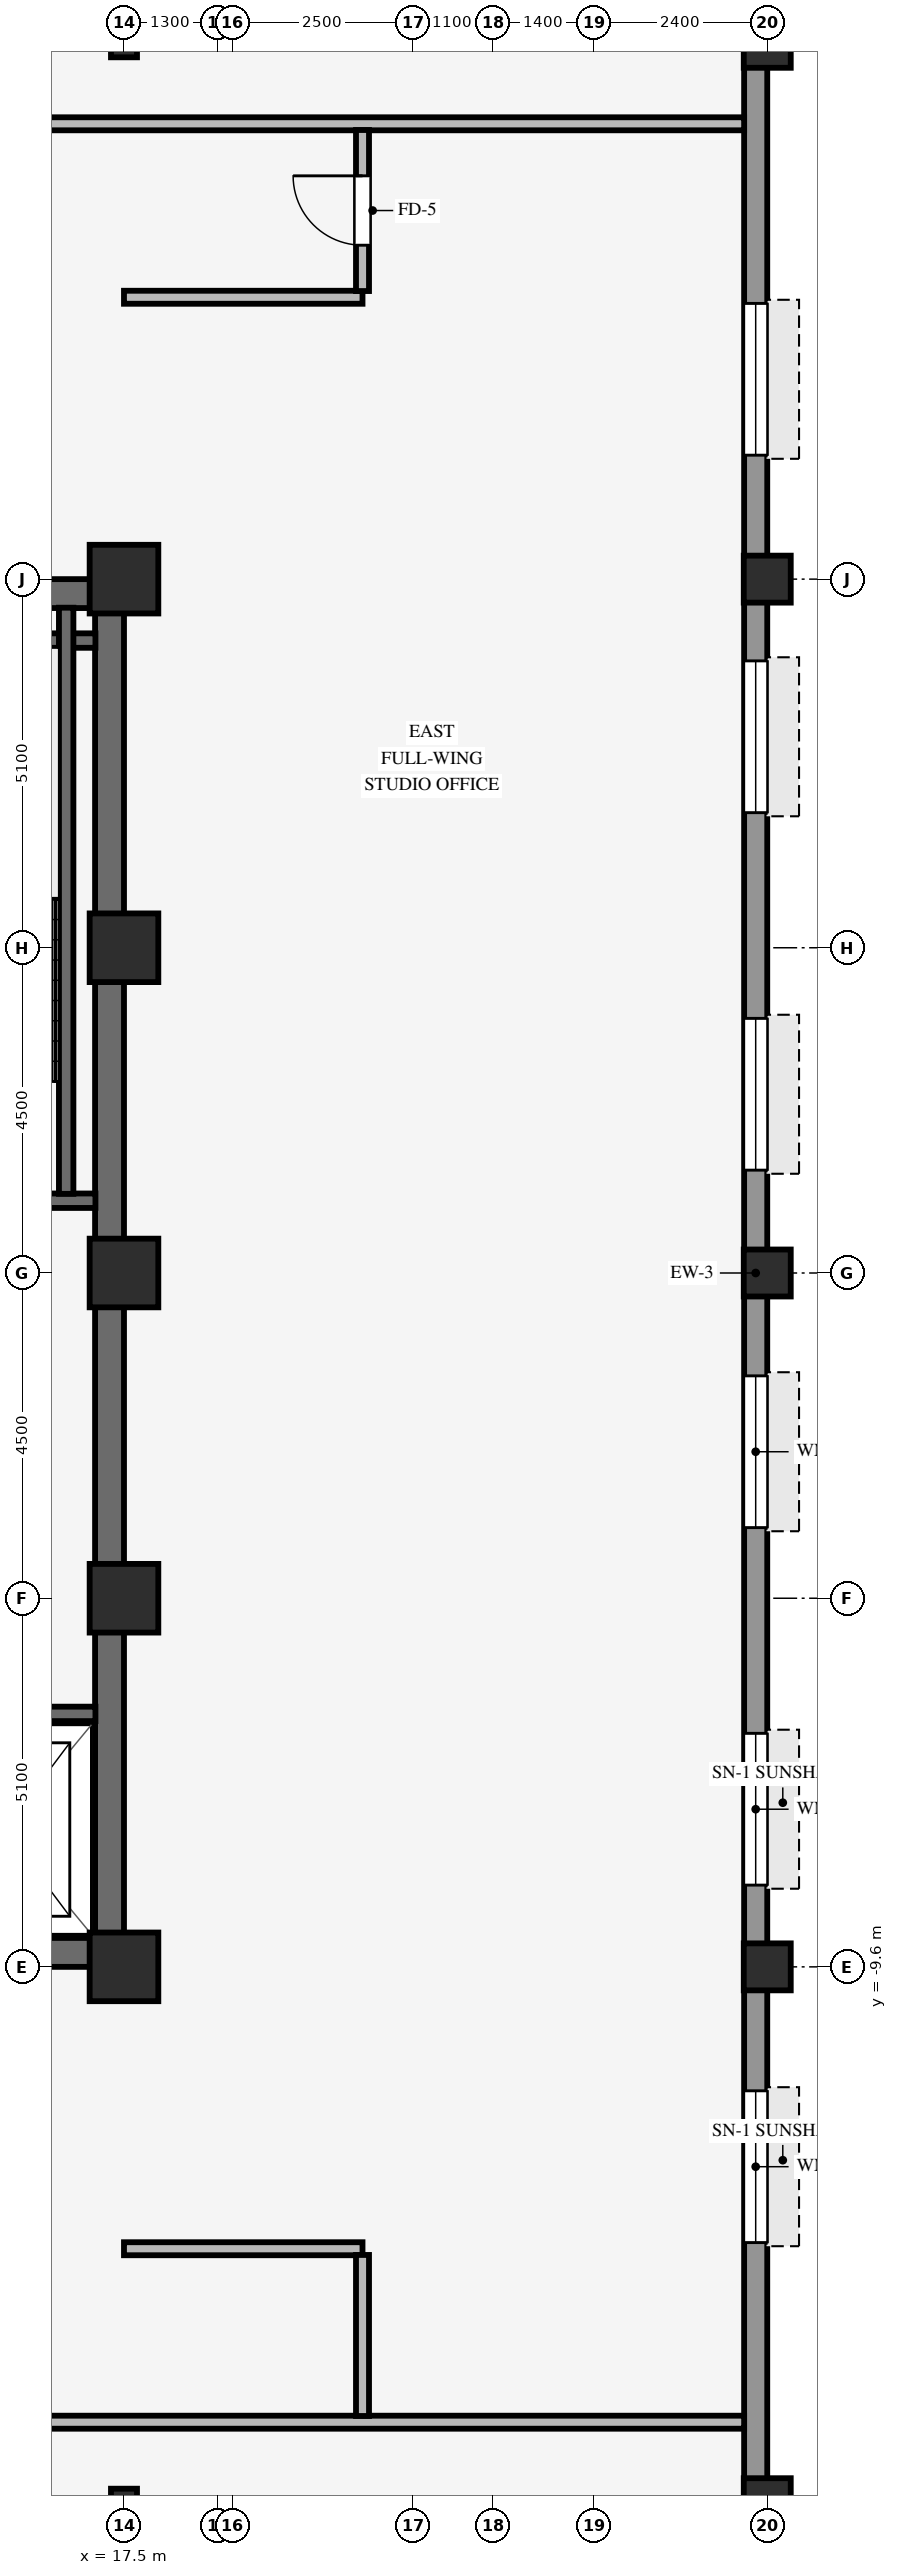
"""IFC4 building model, lengths in metres.
Left out: names, types, materials, properties, quantities, classifications, styles, units other than length and angle.
Written with IfcOpenShell. Run it as: python <this file> out.ifc"""

import sys

from ifc_helpers import new_model, si_unit, direction, frame, frame_2d, origin, origin_2d, place, context, subcontext, project, spatial, rectangle, hollow_rectangle, i_section, extrude, source, transform, mapped, element, fill, save


model = new_model("IFC4")
c1 = context("Model", 3, precision=1e-05, world=origin(), true_north=direction((0.0, 1.0)))
c2 = subcontext(c1, "Body", "Model", "MODEL_VIEW")
j1 = project(units=[si_unit("LENGTHUNIT", "METRE"), si_unit("PLANEANGLEUNIT", "RADIAN")], contexts=[c1])
p1 = place(None, origin())
s1 = spatial("IfcSite", under=j1, at=p1, CompositionType="ELEMENT")
p2 = place(p1, origin())
s2 = spatial("IfcBuilding", under=s1, at=p2, CompositionType="ELEMENT")
p3 = place(p2, frame((0.0, 0.0, 149.4)))
s3 = spatial("IfcBuildingStorey", under=s2, at=p3, CompositionType="ELEMENT", Elevation=149.4)
for number, where, z_axis, x_axis in (
    (1, (9.0, -9.4, 0.0), (0.0, 0.0, 1.0), (1.0, 0.0, 0.0)),
    (2, (9.0, 9.4, 0.0), (0.0, 0.0, 1.0), (1.0, 0.0, 0.0)),
):
    element("IfcWall", number, at=place(p3, frame(where, z_axis=z_axis, x_axis=x_axis)), inside=s3, PredefinedType="SHEAR", context=c2, shape_type="SweptSolid", body=[
        extrude(rectangle(XDim=8.5, YDim=0.4, at=frame_2d((4.25, 0.0))), origin(), (0.0, 0.0, 1.0), 3.37),
    ])
p4 = place(p3, frame((17.3, -9.205, 0.0), z_axis=(0.0, 0.0, 1.0), x_axis=(0.0, 1.0, 0.0)))
e3 = element("IfcWall", 3, at=p4, inside=s3, PredefinedType="SHEAR", context=c2, shape_type="SweptSolid", body=[
    extrude(rectangle(XDim=18.41, YDim=0.4, at=frame_2d((9.205, 0.0))), origin(), (0.0, 0.0, 1.0), 3.37),
])
for number, where, z_axis, x_axis in (
    (4, (17.5, -9.6, 0.0), (0.0, 0.0, 1.0), (1.0, 0.0, 0.0)),
    (5, (17.5, -4.5, 0.0), (0.0, 0.0, 1.0), (1.0, 0.0, 0.0)),
    (6, (17.5, 4.5, 0.0), (0.0, 0.0, 1.0), (1.0, 0.0, 0.0)),
    (7, (17.5, 9.6, 0.0), (0.0, 0.0, 1.0), (1.0, 0.0, 0.0)),
    (8, (17.5, 0.0, 0.0), (0.0, 0.0, 1.0), (1.0, 0.0, 0.0)),
):
    element("IfcColumn", number, at=place(p3, frame(where, z_axis=z_axis, x_axis=x_axis)), inside=s3, PredefinedType="COLUMN", context=c2, shape_type="SweptSolid", body=[
        extrude(rectangle(XDim=0.95, YDim=0.95, at=origin_2d()), origin(), (0.0, 0.0, 1.0), 3.37),
    ])
for number, where, z_axis, x_axis in (
    (9, (26.4, -17.0, 0.0), (0.0, 0.0, 1.0), (1.0, 0.0, 0.0)),
    (10, (26.4, -9.6, 0.0), (0.0, 0.0, 1.0), (1.0, 0.0, 0.0)),
    (11, (26.4, 0.0, 0.0), (0.0, 0.0, 1.0), (1.0, 0.0, 0.0)),
    (12, (26.4, 9.6, 0.0), (0.0, 0.0, 1.0), (1.0, 0.0, 0.0)),
    (13, (26.4, 17.0, 0.0), (0.0, 0.0, 1.0), (1.0, 0.0, 0.0)),
):
    element("IfcColumn", number, at=place(p3, frame(where, z_axis=z_axis, x_axis=x_axis)), inside=s3, PredefinedType="COLUMN", context=c2, shape_type="SweptSolid", body=[
        extrude(hollow_rectangle(XDim=0.65, YDim=0.65, WallThickness=0.04, InnerFilletRadius=0.04, OuterFilletRadius=0.08, at=origin_2d()), origin(), (0.0, 0.0, 1.0), 3.37),
    ])
for number, where, z_axis, x_axis in (
    (14, (17.5, -17.0, 0.0), (0.0, 0.0, 1.0), (1.0, 0.0, 0.0)),
    (15, (17.5, 17.0, 0.0), (0.0, 0.0, 1.0), (1.0, 0.0, 0.0)),
):
    element("IfcColumn", number, at=place(p3, frame(where, z_axis=z_axis, x_axis=x_axis)), inside=s3, PredefinedType="COLUMN", context=c2, shape_type="SweptSolid", body=[
        extrude(i_section(OverallWidth=0.36, OverallDepth=0.36, WebThickness=0.021, FlangeThickness=0.021, FilletRadius=0.018, at=origin_2d()), origin(), (0.0, 0.0, 1.0), 3.37),
    ])
p5 = place(p3, frame((26.24, -20.784, 0.0), z_axis=(0.0, 0.0, 1.0), x_axis=(0.0, 1.0, 0.0)))
e16 = element("IfcWall", 16, at=p5, inside=s3, PredefinedType="STANDARD", context=c2, shape_type="SweptSolid", body=[
    extrude(rectangle(XDim=41.568, YDim=0.32, at=frame_2d((20.784, 0.0))), origin(), (0.0, 0.0, 1.0), 2.705),
])
p6 = place(p5, frame((7.369, 0.0, 0.8)))
e17 = element("IfcOpeningElement", 17, at=p6, cuts=e16, PredefinedType="OPENING", context=c2, shape_type="SweptSolid", body=[
    extrude(rectangle(XDim=2.1, YDim=1.56, at=frame_2d((1.05, 0.78))), frame((0.0, 0.17, 0.0), z_axis=(0.0, -1.0, 0.0), x_axis=(1.0, 0.0, 0.0)), (0.0, 0.0, 1.0), 0.34),
])
p7 = place(p5, frame((12.315, 0.0, 0.8)))
e18 = element("IfcOpeningElement", 18, at=p7, cuts=e16, PredefinedType="OPENING", context=c2, shape_type="SweptSolid", body=[
    extrude(rectangle(XDim=2.1, YDim=1.56, at=frame_2d((1.05, 0.78))), frame((0.0, 0.17, 0.0), z_axis=(0.0, -1.0, 0.0), x_axis=(1.0, 0.0, 0.0)), (0.0, 0.0, 1.0), 0.34),
])
p8 = place(p5, frame((17.261, 0.0, 0.8)))
e19 = element("IfcOpeningElement", 19, at=p8, cuts=e16, PredefinedType="OPENING", context=c2, shape_type="SweptSolid", body=[
    extrude(rectangle(XDim=2.1, YDim=1.56, at=frame_2d((1.05, 0.78))), frame((0.0, 0.17, 0.0), z_axis=(0.0, -1.0, 0.0), x_axis=(1.0, 0.0, 0.0)), (0.0, 0.0, 1.0), 0.34),
])
p9 = place(p5, frame((22.207, 0.0, 0.8)))
e20 = element("IfcOpeningElement", 20, at=p9, cuts=e16, PredefinedType="OPENING", context=c2, shape_type="SweptSolid", body=[
    extrude(rectangle(XDim=2.1, YDim=1.56, at=frame_2d((1.05, 0.78))), frame((0.0, 0.17, 0.0), z_axis=(0.0, -1.0, 0.0), x_axis=(1.0, 0.0, 0.0)), (0.0, 0.0, 1.0), 0.34),
])
p10 = place(p5, frame((27.153, 0.0, 0.8)))
e21 = element("IfcOpeningElement", 21, at=p10, cuts=e16, PredefinedType="OPENING", context=c2, shape_type="SweptSolid", body=[
    extrude(rectangle(XDim=2.1, YDim=1.56, at=frame_2d((1.05, 0.78))), frame((0.0, 0.17, 0.0), z_axis=(0.0, -1.0, 0.0), x_axis=(1.0, 0.0, 0.0)), (0.0, 0.0, 1.0), 0.34),
])
p11 = place(p5, frame((32.099, 0.0, 0.8)))
e22 = element("IfcOpeningElement", 22, at=p11, cuts=e16, PredefinedType="OPENING", context=c2, shape_type="SweptSolid", body=[
    extrude(rectangle(XDim=2.1, YDim=1.56, at=frame_2d((1.05, 0.78))), frame((0.0, 0.17, 0.0), z_axis=(0.0, -1.0, 0.0), x_axis=(1.0, 0.0, 0.0)), (0.0, 0.0, 1.0), 0.34),
])
for number, where, z_axis, x_axis in (
    (23, (13.535, 1.0, 0.0), (0.0, 0.0, 1.0), (1.0, 0.0, 0.0)),
    (24, (13.535, 8.75, 0.0), (0.0, 0.0, 1.0), (1.0, 0.0, 0.0)),
):
    element("IfcWall", number, at=place(p3, frame(where, z_axis=z_axis, x_axis=x_axis)), inside=s3, PredefinedType="SHEAR", context=c2, shape_type="SweptSolid", body=[
        extrude(rectangle(XDim=3.57, YDim=0.2, at=frame_2d((1.785, 0.0))), origin(), (0.0, 0.0, 1.0), 3.37),
    ])
p12 = place(p3, frame((16.7, 1.095, 0.0), z_axis=(0.0, 0.0, 1.0), x_axis=(0.0, 1.0, 0.0)))
e25 = element("IfcWall", 25, at=p12, inside=s3, PredefinedType="SHEAR", context=c2, shape_type="SweptSolid", body=[
    extrude(rectangle(XDim=8.11, YDim=0.2, at=frame_2d((4.055, 0.0))), origin(), (0.0, 0.0, 1.0), 3.37),
])
p13 = place(p3, frame((14.645, -6.1, 0.0), z_axis=(0.0, 0.0, 1.0), x_axis=(1.0, 0.0, 0.0)))
e26 = element("IfcWall", 26, at=p13, inside=s3, PredefinedType="SHEAR", context=c2, shape_type="SweptSolid", body=[
    extrude(rectangle(XDim=2.46, YDim=0.2, at=frame_2d((1.23, 0.0))), origin(), (0.0, 0.0, 1.0), 3.37),
])
p14 = place(p3, frame((-26.08, -15.9, 0.0), z_axis=(0.0, 0.0, 1.0), x_axis=(1.0, 0.0, 0.0)))
e27 = element("IfcWall", 27, at=p14, inside=s3, PredefinedType="PARTITIONING", context=c2, shape_type="SweptSolid", body=[
    extrude(rectangle(XDim=52.16, YDim=0.18, at=frame_2d((26.08, 0.0))), origin(), (0.0, 0.0, 1.0), 3.36),
])
p15 = place(p14, frame((24.5, 0.0, 0.0)))
e28 = element("IfcOpeningElement", 28, at=p15, cuts=e27, PredefinedType="OPENING", context=c2, shape_type="SweptSolid", body=[
    extrude(rectangle(XDim=0.96, YDim=2.1, at=frame_2d((0.48, 1.05))), frame((0.0, 0.1, 0.0), z_axis=(0.0, -1.0, 0.0), x_axis=(1.0, 0.0, 0.0)), (0.0, 0.0, 1.0), 0.2),
])
p16 = place(p14, frame((40.5, 0.0, 0.0)))
e29 = element("IfcOpeningElement", 29, at=p16, cuts=e27, PredefinedType="OPENING", context=c2, shape_type="SweptSolid", body=[
    extrude(rectangle(XDim=0.96, YDim=2.1, at=frame_2d((0.48, 1.05))), frame((0.0, 0.1, 0.0), z_axis=(0.0, -1.0, 0.0), x_axis=(1.0, 0.0, 0.0)), (0.0, 0.0, 1.0), 0.2),
])
p17 = place(p14, frame((13.16, 0.0, 0.0)))
e30 = element("IfcOpeningElement", 30, at=p17, cuts=e27, PredefinedType="OPENING", context=c2, shape_type="SweptSolid", body=[
    extrude(rectangle(XDim=0.96, YDim=2.1, at=frame_2d((0.48, 1.05))), frame((0.0, 0.1, 0.0), z_axis=(0.0, -1.0, 0.0), x_axis=(1.0, 0.0, 0.0)), (0.0, 0.0, 1.0), 0.2),
])
p18 = place(p14, frame((6.425, 0.0, 0.0)))
e31 = element("IfcOpeningElement", 31, at=p18, cuts=e27, PredefinedType="OPENING", context=c2, shape_type="SweptSolid", body=[
    extrude(rectangle(XDim=0.96, YDim=2.1, at=frame_2d((0.48, 1.05))), frame((0.0, 0.1, 0.0), z_axis=(0.0, -1.0, 0.0), x_axis=(1.0, 0.0, 0.0)), (0.0, 0.0, 1.0), 0.2),
])
for number, where, z_axis, x_axis in (
    (32, (17.5, -13.5, 0.0), (0.0, 0.0, 1.0), (1.0, 0.0, 0.0)),
    (33, (17.5, 13.5, 0.0), (0.0, 0.0, 1.0), (1.0, 0.0, 0.0)),
):
    element("IfcWall", number, at=place(p3, frame(where, z_axis=z_axis, x_axis=x_axis)), inside=s3, PredefinedType="PARTITIONING", context=c2, shape_type="SweptSolid", body=[
        extrude(rectangle(XDim=3.3, YDim=0.18, at=frame_2d((1.65, 0.0))), origin(), (0.0, 0.0, 1.0), 2.998),
    ])
p19 = place(p3, frame((-26.08, 15.9, 0.0), z_axis=(0.0, 0.0, 1.0), x_axis=(1.0, 0.0, 0.0)))
e34 = element("IfcWall", 34, at=p19, inside=s3, PredefinedType="PARTITIONING", context=c2, shape_type="SweptSolid", body=[
    extrude(rectangle(XDim=52.16, YDim=0.18, at=frame_2d((26.08, 0.0))), origin(), (0.0, 0.0, 1.0), 3.36),
])
p20 = place(p19, frame((26.72, 0.0, 0.0)))
e35 = element("IfcOpeningElement", 35, at=p20, cuts=e34, PredefinedType="OPENING", context=c2, shape_type="SweptSolid", body=[
    extrude(rectangle(XDim=0.96, YDim=2.1, at=frame_2d((0.48, 1.05))), frame((0.0, 0.1, 0.0), z_axis=(0.0, -1.0, 0.0), x_axis=(1.0, 0.0, 0.0)), (0.0, 0.0, 1.0), 0.2),
])
p21 = place(p19, frame((40.5, 0.0, 0.0)))
e36 = element("IfcOpeningElement", 36, at=p21, cuts=e34, PredefinedType="OPENING", context=c2, shape_type="SweptSolid", body=[
    extrude(rectangle(XDim=0.96, YDim=2.1, at=frame_2d((0.48, 1.05))), frame((0.0, 0.1, 0.0), z_axis=(0.0, -1.0, 0.0), x_axis=(1.0, 0.0, 0.0)), (0.0, 0.0, 1.0), 0.2),
])
p22 = place(p19, frame((13.61, 0.0, 0.0)))
e37 = element("IfcOpeningElement", 37, at=p22, cuts=e34, PredefinedType="OPENING", context=c2, shape_type="SweptSolid", body=[
    extrude(rectangle(XDim=0.96, YDim=2.1, at=frame_2d((0.48, 1.05))), frame((0.0, 0.1, 0.0), z_axis=(0.0, -1.0, 0.0), x_axis=(1.0, 0.0, 0.0)), (0.0, 0.0, 1.0), 0.2),
])
p23 = place(p3, frame((20.8, -15.814, 0.0), z_axis=(0.0, 0.0, 1.0), x_axis=(0.0, 1.0, 0.0)))
e38 = element("IfcWall", 38, at=p23, inside=s3, PredefinedType="PARTITIONING", context=c2, shape_type="SweptSolid", body=[
    extrude(rectangle(XDim=2.228, YDim=0.18, at=frame_2d((1.114, 0.0))), origin(), (0.0, 0.0, 1.0), 3.36),
])
p24 = place(p3, frame((20.8, 13.586, 0.0), z_axis=(0.0, 0.0, 1.0), x_axis=(0.0, 1.0, 0.0)))
e39 = element("IfcWall", 39, at=p24, inside=s3, PredefinedType="PARTITIONING", context=c2, shape_type="SweptSolid", body=[
    extrude(rectangle(XDim=2.228, YDim=0.18, at=frame_2d((1.114, 0.0))), origin(), (0.0, 0.0, 1.0), 3.36),
])
p25 = place(p24, frame((0.634, 0.0, 0.0)))
e40 = element("IfcOpeningElement", 40, at=p25, cuts=e39, PredefinedType="OPENING", context=c2, shape_type="SweptSolid", body=[
    extrude(rectangle(XDim=0.96, YDim=2.1, at=frame_2d((0.48, 1.05))), frame((0.0, 0.1, 0.0), z_axis=(0.0, -1.0, 0.0), x_axis=(1.0, 0.0, 0.0)), (0.0, 0.0, 1.0), 0.2),
])
m1 = source(origin(), c2, "Body", "SweptSolid", [
    extrude(rectangle(XDim=2.1, YDim=1.56, at=frame_2d((1.05, 0.78))), frame((0.0, 0.03, 0.0), z_axis=(0.0, -1.0, 0.0), x_axis=(1.0, 0.0, 0.0)), (0.0, 0.0, 1.0), 0.06),
])
p26 = place(p6, origin())
e41 = element("IfcWindow", 41, at=p26, inside=s3, PartitioningType="SINGLE_PANEL", PredefinedType="WINDOW", context=c2, shape_type="MappedRepresentation", body=[
    mapped(m1, transform((0.0, 0.0, 0.0), scale=1.0)),
])
fill(e17, e41)
p27 = place(p7, origin())
e42 = element("IfcWindow", 42, at=p27, inside=s3, PartitioningType="SINGLE_PANEL", PredefinedType="WINDOW", context=c2, shape_type="MappedRepresentation", body=[
    mapped(m1, transform((0.0, 0.0, 0.0), scale=1.0)),
])
fill(e18, e42)
p28 = place(p8, origin())
e43 = element("IfcWindow", 43, at=p28, inside=s3, PartitioningType="SINGLE_PANEL", PredefinedType="WINDOW", context=c2, shape_type="MappedRepresentation", body=[
    mapped(m1, transform((0.0, 0.0, 0.0), scale=1.0)),
])
fill(e19, e43)
p29 = place(p9, origin())
e44 = element("IfcWindow", 44, at=p29, inside=s3, PartitioningType="SINGLE_PANEL", PredefinedType="WINDOW", context=c2, shape_type="MappedRepresentation", body=[
    mapped(m1, transform((0.0, 0.0, 0.0), scale=1.0)),
])
fill(e20, e44)
p30 = place(p10, origin())
e45 = element("IfcWindow", 45, at=p30, inside=s3, PartitioningType="SINGLE_PANEL", PredefinedType="WINDOW", context=c2, shape_type="MappedRepresentation", body=[
    mapped(m1, transform((0.0, 0.0, 0.0), scale=1.0)),
])
fill(e21, e45)
p31 = place(p11, origin())
e46 = element("IfcWindow", 46, at=p31, inside=s3, PartitioningType="SINGLE_PANEL", PredefinedType="WINDOW", context=c2, shape_type="MappedRepresentation", body=[
    mapped(m1, transform((0.0, 0.0, 0.0), scale=1.0)),
])
fill(e22, e46)
m2 = source(origin(), c2, "Body", "SweptSolid", [
    extrude(rectangle(XDim=0.96, YDim=2.1, at=frame_2d((0.48, 1.05))), frame((0.0, 0.025, 0.0), z_axis=(0.0, -1.0, 0.0), x_axis=(1.0, 0.0, 0.0)), (0.0, 0.0, 1.0), 0.05),
])
p32 = place(p25, origin())
e47 = element("IfcDoor", 47, at=p32, inside=s3, OperationType="SINGLE_SWING_RIGHT", PredefinedType="DOOR", context=c2, shape_type="MappedRepresentation", body=[
    mapped(m2, transform((0.0, 0.0, 0.0), scale=1.0)),
])
fill(e40, e47)
save(model, sys.argv[1])
